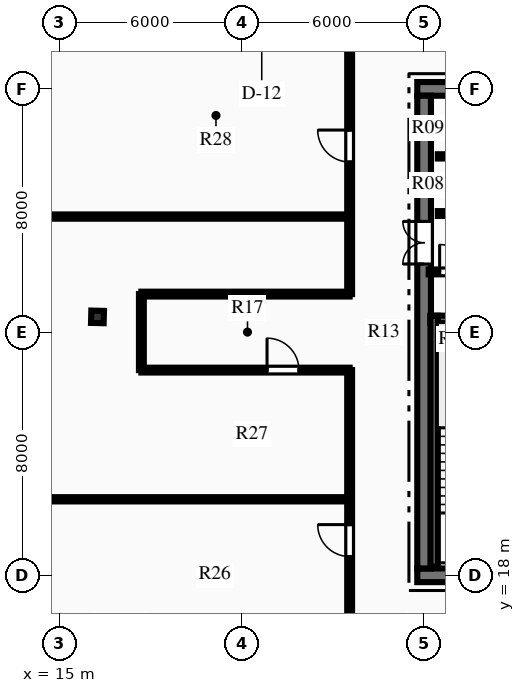
"""IFC4 building model, lengths in metres.
Left out: names, types, materials, properties, quantities, classifications, styles, units other than length and angle.
Written with IfcOpenShell. Run it as: python <this file> out.ifc"""

import sys

from ifc_helpers import new_model, si_unit, direction, frame, frame_2d, origin, origin_2d, place, context, subcontext, project, spatial, rectangle, i_section, extrude, element, fill, save


model = new_model("IFC4")
c1 = context("Model", 3, precision=1e-05, world=origin(), true_north=direction((0.0, 1.0)))
c2 = subcontext(c1, "Body", "Model", "MODEL_VIEW")
j1 = project(units=[si_unit("LENGTHUNIT", "METRE"), si_unit("PLANEANGLEUNIT", "RADIAN")], contexts=[c1])
p1 = place(None, origin())
s1 = spatial("IfcSite", under=j1, at=p1, CompositionType="ELEMENT")
p2 = place(p1, origin())
s2 = spatial("IfcBuilding", under=s1, at=p2, CompositionType="ELEMENT")
p3 = place(p2, frame((0.0, 0.0, 328.95)))
s3 = spatial("IfcBuildingStorey", under=s2, at=p3, CompositionType="ELEMENT", Elevation=328.95)
p4 = place(p3, frame((26.775, 18.0, 0.0), z_axis=(0.0, 0.0, 1.0), x_axis=(1.0, 0.0, 0.0)))
e1 = element("IfcWall", 1, at=p4, inside=s3, PredefinedType="SHEAR", context=c2, shape_type="SweptSolid", body=[
    extrude(rectangle(XDim=18.45, YDim=0.45, at=frame_2d((9.225, 0.0))), origin(), (0.0, 0.0, 1.0), 3.75),
])
p5 = place(p4, frame((7.325, 0.0, 0.0)))
e2 = element("IfcOpeningElement", 2, at=p5, cuts=e1, PredefinedType="OPENING", context=c2, shape_type="SweptSolid", body=[
    extrude(rectangle(XDim=1.1, YDim=2.15, at=frame_2d((0.55, 1.075))), frame((0.0, 0.235, 0.0), z_axis=(0.0, -1.0, 0.0), x_axis=(1.0, 0.0, 0.0)), (0.0, 0.0, 1.0), 0.47),
])
p6 = place(p4, frame((10.025, 0.0, 0.0)))
e3 = element("IfcOpeningElement", 3, at=p6, cuts=e1, PredefinedType="OPENING", context=c2, shape_type="SweptSolid", body=[
    extrude(rectangle(XDim=1.1, YDim=2.15, at=frame_2d((0.55, 1.075))), frame((0.0, 0.235, 0.0), z_axis=(0.0, -1.0, 0.0), x_axis=(1.0, 0.0, 0.0)), (0.0, 0.0, 1.0), 0.47),
])
p7 = place(p3, frame((26.775, 34.0, 0.0), z_axis=(0.0, 0.0, 1.0), x_axis=(1.0, 0.0, 0.0)))
e4 = element("IfcWall", 4, at=p7, inside=s3, PredefinedType="SHEAR", context=c2, shape_type="SweptSolid", body=[
    extrude(rectangle(XDim=18.45, YDim=0.45, at=frame_2d((9.225, 0.0))), origin(), (0.0, 0.0, 1.0), 3.75),
])
p8 = place(p3, frame((27.0, 18.225, 0.0), z_axis=(0.0, 0.0, 1.0), x_axis=(0.0, 1.0, 0.0)))
e5 = element("IfcWall", 5, at=p8, inside=s3, PredefinedType="SHEAR", context=c2, shape_type="SweptSolid", body=[
    extrude(rectangle(XDim=15.55, YDim=0.45, at=frame_2d((7.775, 0.0))), origin(), (0.0, 0.0, 1.0), 3.75),
])
p9 = place(p8, frame((10.015, 0.0, 0.0)))
e6 = element("IfcOpeningElement", 6, at=p9, cuts=e5, PredefinedType="OPENING", context=c2, shape_type="SweptSolid", body=[
    extrude(rectangle(XDim=1.4, YDim=2.2, at=frame_2d((0.7, 1.1))), frame((0.0, 0.235, 0.0), z_axis=(0.0, -1.0, 0.0), x_axis=(1.0, 0.0, 0.0)), (0.0, 0.0, 1.0), 0.47),
])
p10 = place(p3, frame((27.21, 26.42, 0.0), z_axis=(0.0, 0.0, 1.0), x_axis=(1.0, 0.0, 0.0)))
e7 = element("IfcWall", 7, at=p10, inside=s3, PredefinedType="SHEAR", context=c2, shape_type="SweptSolid", body=[
    extrude(rectangle(XDim=3.98, YDim=0.24, at=frame_2d((1.99, 0.0))), origin(), (0.0, 0.0, 1.0), 3.75),
])
p11 = place(p3, frame((27.33, 18.28, 0.0), z_axis=(0.0, 0.0, 1.0), x_axis=(0.0, 1.0, 0.0)))
e8 = element("IfcWall", 8, at=p11, inside=s3, PredefinedType="SHEAR", context=c2, shape_type="SweptSolid", body=[
    extrude(rectangle(XDim=8.26, YDim=0.24, at=frame_2d((4.13, 0.0))), origin(), (0.0, 0.0, 1.0), 3.75),
])
p12 = place(p3, frame((16.256, 26.5, 0.0), z_axis=(0.0, 0.0, 1.0), x_axis=(0.025304572866, 0.999679788028, 0.0)))
e9 = element("IfcColumn", 9, at=p12, inside=s3, PredefinedType="COLUMN", context=c2, shape_type="SweptSolid", body=[
    extrude(i_section(OverallWidth=0.406, OverallDepth=0.416, WebThickness=0.03, FlangeThickness=0.048, at=origin_2d()), origin(), (0.0, 0.0, 1.0), 3.75),
])
p13 = place(p3, frame((27.15, 27.98, 0.0), z_axis=(0.0, 0.0, 1.0), x_axis=(1.0, 0.0, 0.0)))
e10 = element("IfcWall", 10, at=p13, inside=s3, PredefinedType="PARTITIONING", context=c2, shape_type="SweptSolid", body=[
    extrude(rectangle(XDim=4.05, YDim=0.16, at=frame_2d((2.025, 0.0))), origin(), (0.0, 0.0, 1.0), 3.49),
])
p14 = place(p13, frame((0.36, 0.0, 0.0)))
e11 = element("IfcOpeningElement", 11, at=p14, cuts=e10, PredefinedType="OPENING", context=c2, shape_type="SweptSolid", body=[
    extrude(rectangle(XDim=0.9, YDim=2.15, at=frame_2d((0.45, 1.075))), frame((0.0, 0.09, 0.0), z_axis=(0.0, -1.0, 0.0), x_axis=(1.0, 0.0, 0.0)), (0.0, 0.0, 1.0), 0.18),
])
p15 = place(p13, frame((1.63, 0.0, 0.0)))
e12 = element("IfcOpeningElement", 12, at=p15, cuts=e10, PredefinedType="OPENING", context=c2, shape_type="SweptSolid", body=[
    extrude(rectangle(XDim=0.9, YDim=2.15, at=frame_2d((0.45, 1.075))), frame((0.0, 0.09, 0.0), z_axis=(0.0, -1.0, 0.0), x_axis=(1.0, 0.0, 0.0)), (0.0, 0.0, 1.0), 0.18),
])
p16 = place(p13, frame((2.788, 0.0, 0.0)))
e13 = element("IfcOpeningElement", 13, at=p16, cuts=e10, PredefinedType="OPENING", context=c2, shape_type="SweptSolid", body=[
    extrude(rectangle(XDim=0.9, YDim=2.15, at=frame_2d((0.45, 1.075))), frame((0.0, 0.09, 0.0), z_axis=(0.0, -1.0, 0.0), x_axis=(1.0, 0.0, 0.0)), (0.0, 0.0, 1.0), 0.18),
])
p17 = place(p3, frame((27.45, 29.9, 0.0), z_axis=(0.0, 0.0, 1.0), x_axis=(1.0, 0.0, 0.0)))
e14 = element("IfcWall", 14, at=p17, inside=s3, PredefinedType="PARTITIONING", context=c2, shape_type="SweptSolid", body=[
    extrude(rectangle(XDim=4.43, YDim=0.16, at=frame_2d((2.215, 0.0))), origin(), (0.0, 0.0, 1.0), 3.49),
])
p18 = place(p17, frame((1.675, 0.0, 0.0)))
e15 = element("IfcOpeningElement", 15, at=p18, cuts=e14, PredefinedType="OPENING", context=c2, shape_type="SweptSolid", body=[
    extrude(rectangle(XDim=0.95, YDim=2.15, at=frame_2d((0.475, 1.075))), frame((0.0, 0.09, 0.0), z_axis=(0.0, -1.0, 0.0), x_axis=(1.0, 0.0, 0.0)), (0.0, 0.0, 1.0), 0.18),
])
p19 = place(p3, frame((27.45, 31.78, 0.0), z_axis=(0.0, 0.0, 1.0), x_axis=(1.0, 0.0, 0.0)))
e16 = element("IfcWall", 16, at=p19, inside=s3, PredefinedType="PARTITIONING", context=c2, shape_type="SweptSolid", body=[
    extrude(rectangle(XDim=4.35, YDim=0.14, at=frame_2d((2.175, 0.0))), origin(), (0.0, 0.0, 1.0), 3.49),
])
p20 = place(p19, frame((1.7, 0.0, 0.0)))
e17 = element("IfcOpeningElement", 17, at=p20, cuts=e16, PredefinedType="OPENING", context=c2, shape_type="SweptSolid", body=[
    extrude(rectangle(XDim=0.9, YDim=2.15, at=frame_2d((0.45, 1.075))), frame((0.0, 0.08, 0.0), z_axis=(0.0, -1.0, 0.0), x_axis=(1.0, 0.0, 0.0)), (0.0, 0.0, 1.0), 0.16),
])
p21 = place(p3, frame((24.55, 15.55, 0.0), z_axis=(0.0, 0.0, 1.0), x_axis=(0.0, 1.0, 0.0)))
e18 = element("IfcWall", 18, at=p21, inside=s3, PredefinedType="PARTITIONING", context=c2, shape_type="SweptSolid", body=[
    extrude(rectangle(XDim=9.2, YDim=0.16, at=frame_2d((4.6, 0.0))), origin(), (0.0, 0.0, 1.0), 3.49),
])
p22 = place(p21, frame((3.067, 0.0, 0.0)))
e19 = element("IfcOpeningElement", 19, at=p22, cuts=e18, PredefinedType="OPENING", context=c2, shape_type="SweptSolid", body=[
    extrude(rectangle(XDim=1.05, YDim=2.15, at=frame_2d((0.525, 1.075))), frame((0.0, 0.09, 0.0), z_axis=(0.0, -1.0, 0.0), x_axis=(1.0, 0.0, 0.0)), (0.0, 0.0, 1.0), 0.18),
])
p23 = place(p3, frame((24.55, 27.25, 0.0), z_axis=(0.0, 0.0, 1.0), x_axis=(0.0, 1.0, 0.0)))
e20 = element("IfcWall", 20, at=p23, inside=s3, PredefinedType="PARTITIONING", context=c2, shape_type="SweptSolid", body=[
    extrude(rectangle(XDim=9.2, YDim=0.16, at=frame_2d((4.6, 0.0))), origin(), (0.0, 0.0, 1.0), 3.49),
])
p24 = place(p23, frame((4.346, 0.0, 0.0)))
e21 = element("IfcOpeningElement", 21, at=p24, cuts=e20, PredefinedType="OPENING", context=c2, shape_type="SweptSolid", body=[
    extrude(rectangle(XDim=1.05, YDim=2.15, at=frame_2d((0.525, 1.075))), frame((0.0, 0.09, 0.0), z_axis=(0.0, -1.0, 0.0), x_axis=(1.0, 0.0, 0.0)), (0.0, 0.0, 1.0), 0.18),
])
p25 = place(p3, frame((17.7, 24.75, 0.0), z_axis=(0.0, 0.0, 1.0), x_axis=(1.0, 0.0, 0.0)))
e22 = element("IfcWall", 22, at=p25, inside=s3, PredefinedType="PARTITIONING", context=c2, shape_type="SweptSolid", body=[
    extrude(rectangle(XDim=6.85, YDim=0.16, at=frame_2d((3.425, 0.0))), origin(), (0.0, 0.0, 1.0), 3.49),
])
p26 = place(p25, frame((4.133, 0.0, 0.0)))
e23 = element("IfcOpeningElement", 23, at=p26, cuts=e22, PredefinedType="OPENING", context=c2, shape_type="SweptSolid", body=[
    extrude(rectangle(XDim=1.05, YDim=2.15, at=frame_2d((0.525, 1.075))), frame((0.0, 0.09, 0.0), z_axis=(0.0, -1.0, 0.0), x_axis=(1.0, 0.0, 0.0)), (0.0, 0.0, 1.0), 0.18),
])
p27 = place(p3, frame((17.7, 27.25, 0.0), z_axis=(0.0, 0.0, 1.0), x_axis=(1.0, 0.0, 0.0)))
e24 = element("IfcWall", 24, at=p27, inside=s3, PredefinedType="PARTITIONING", context=c2, shape_type="SweptSolid", body=[
    extrude(rectangle(XDim=6.85, YDim=0.16, at=frame_2d((3.425, 0.0))), origin(), (0.0, 0.0, 1.0), 3.49),
])
p28 = place(p3, frame((17.7, 24.75, 0.0), z_axis=(0.0, 0.0, 1.0), x_axis=(0.0, 1.0, 0.0)))
e25 = element("IfcWall", 25, at=p28, inside=s3, PredefinedType="PARTITIONING", context=c2, shape_type="SweptSolid", body=[
    extrude(rectangle(XDim=2.5, YDim=0.16, at=frame_2d((1.25, 0.0))), origin(), (0.0, 0.0, 1.0), 3.49),
])
p29 = place(p3, frame((14.061, 20.5, 0.0), z_axis=(0.0, 0.0, 1.0), x_axis=(1.0, 0.0, 0.0)))
e26 = element("IfcWall", 26, at=p29, inside=s3, PredefinedType="PARTITIONING", context=c2, shape_type="SweptSolid", body=[
    extrude(rectangle(XDim=10.489, YDim=0.14, at=frame_2d((5.245, 0.0))), origin(), (0.0, 0.0, 1.0), 3.49),
])
p30 = place(p3, frame((14.11, 29.8, 0.0), z_axis=(0.0, 0.0, 1.0), x_axis=(1.0, 0.0, 0.0)))
e27 = element("IfcWall", 27, at=p30, inside=s3, PredefinedType="PARTITIONING", context=c2, shape_type="SweptSolid", body=[
    extrude(rectangle(XDim=10.44, YDim=0.14, at=frame_2d((5.22, 0.0))), origin(), (0.0, 0.0, 1.0), 3.49),
])
p31 = place(p14, origin())
e28 = element("IfcDoor", 28, at=p31, inside=s3, OperationType="SINGLE_SWING_LEFT", PredefinedType="DOOR", context=c2, shape_type="SweptSolid", body=[
    extrude(rectangle(XDim=0.9, YDim=2.15, at=frame_2d((0.45, 1.075))), frame((0.0, 0.025, 0.0), z_axis=(0.0, -1.0, 0.0), x_axis=(1.0, 0.0, 0.0)), (0.0, 0.0, 1.0), 0.05),
])
fill(e11, e28)
p32 = place(p9, origin())
e29 = element("IfcDoor", 29, at=p32, inside=s3, OperationType="DOUBLE_DOOR_SINGLE_SWING", PredefinedType="DOOR", context=c2, shape_type="SweptSolid", body=[
    extrude(rectangle(XDim=1.4, YDim=2.2, at=frame_2d((0.7, 1.1))), frame((0.0, 0.025, 0.0), z_axis=(0.0, -1.0, 0.0), x_axis=(1.0, 0.0, 0.0)), (0.0, 0.0, 1.0), 0.05),
])
fill(e6, e29)
p33 = place(p22, origin())
e30 = element("IfcDoor", 30, at=p33, inside=s3, OperationType="SINGLE_SWING_RIGHT", PredefinedType="DOOR", context=c2, shape_type="SweptSolid", body=[
    extrude(rectangle(XDim=1.05, YDim=2.15, at=frame_2d((0.525, 1.075))), frame((0.0, 0.025, 0.0), z_axis=(0.0, -1.0, 0.0), x_axis=(1.0, 0.0, 0.0)), (0.0, 0.0, 1.0), 0.05),
])
fill(e19, e30)
p34 = place(p26, origin())
e31 = element("IfcDoor", 31, at=p34, inside=s3, OperationType="SINGLE_SWING_LEFT", PredefinedType="DOOR", context=c2, shape_type="SweptSolid", body=[
    extrude(rectangle(XDim=1.05, YDim=2.15, at=frame_2d((0.525, 1.075))), frame((0.0, 0.025, 0.0), z_axis=(0.0, -1.0, 0.0), x_axis=(1.0, 0.0, 0.0)), (0.0, 0.0, 1.0), 0.05),
])
fill(e23, e31)
p35 = place(p24, origin())
e32 = element("IfcDoor", 32, at=p35, inside=s3, OperationType="SINGLE_SWING_RIGHT", PredefinedType="DOOR", context=c2, shape_type="SweptSolid", body=[
    extrude(rectangle(XDim=1.05, YDim=2.15, at=frame_2d((0.525, 1.075))), frame((0.0, 0.025, 0.0), z_axis=(0.0, -1.0, 0.0), x_axis=(1.0, 0.0, 0.0)), (0.0, 0.0, 1.0), 0.05),
])
fill(e21, e32)
save(model, sys.argv[1])
